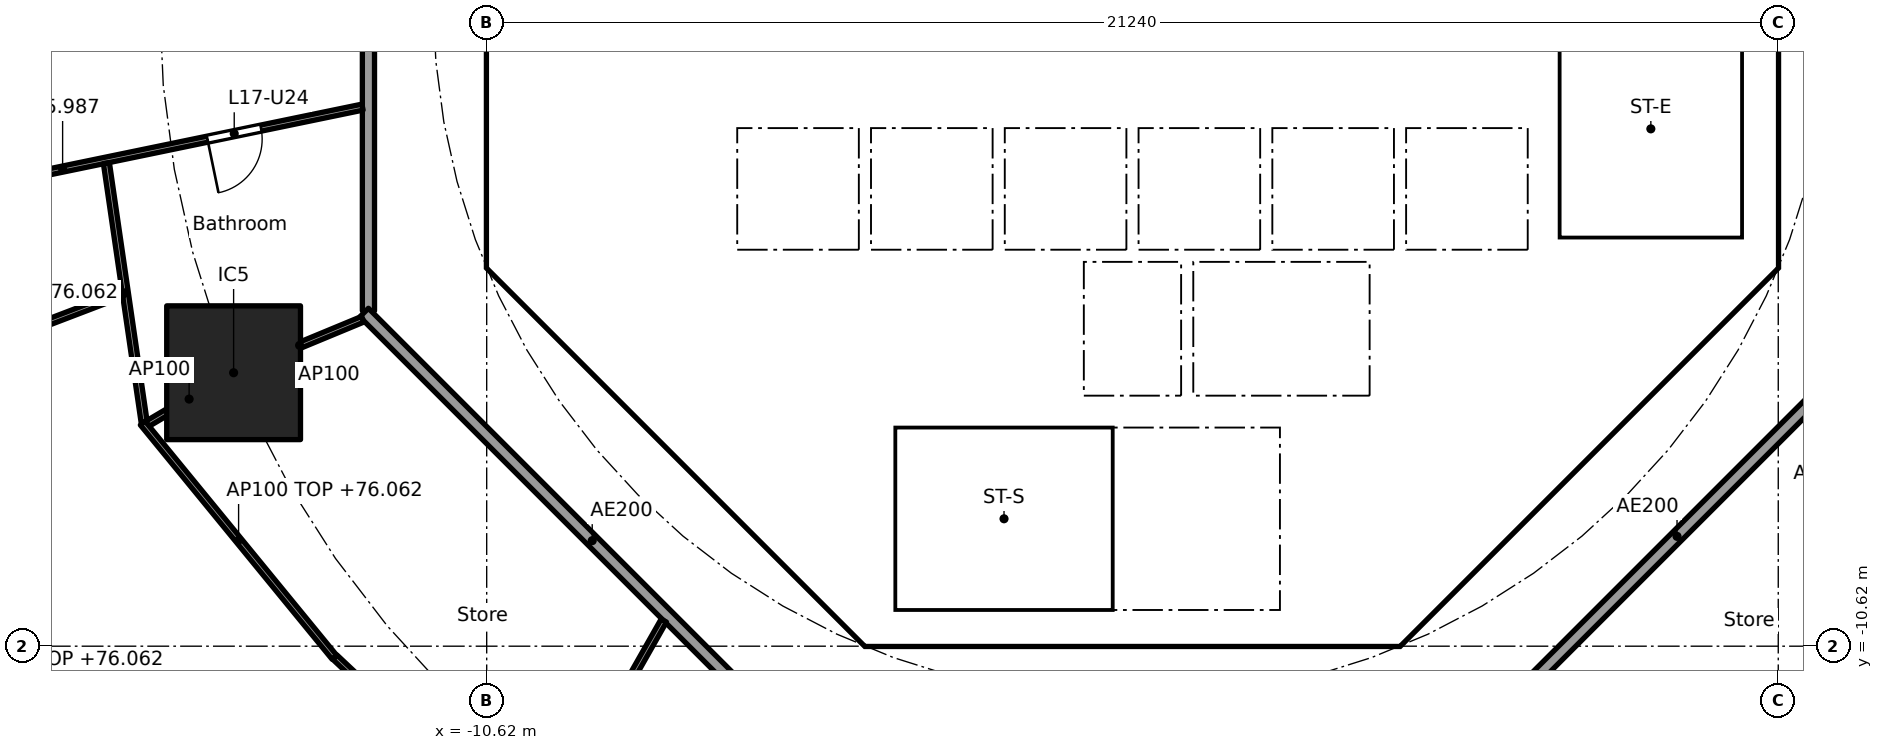
"""IFC4 building model, lengths in metres.
Left out: names, types, materials, properties, quantities, classifications, styles, units other than length and angle.
Written with IfcOpenShell. Run it as: python <this file> out.ifc"""

import sys

from ifc_helpers import new_model, si_unit, direction, frame, frame_2d, origin, origin_2d, place, context, subcontext, project, spatial, polyline, rectangle, outline, extrude, element, fill, save


model = new_model("IFC4")
c1 = context("Model", 3, precision=1e-05, world=origin(), true_north=direction((0.0, 1.0)))
c2 = subcontext(c1, "Body", "Model", "MODEL_VIEW")
j1 = project(units=[si_unit("LENGTHUNIT", "METRE"), si_unit("PLANEANGLEUNIT", "RADIAN")], contexts=[c1])
p1 = place(None, origin())
s1 = spatial("IfcSite", under=j1, at=p1, CompositionType="ELEMENT")
p2 = place(p1, origin())
s2 = spatial("IfcBuilding", under=s1, at=p2, CompositionType="ELEMENT")
p3 = place(p2, frame((0.0, 0.0, 73.3)))
s3 = spatial("IfcBuildingStorey", under=s2, at=p3, CompositionType="ELEMENT", Elevation=73.3)
p4 = place(p3, frame((-14.782, -6.123, 0.0), z_axis=(0.0, 0.0, 1.0), x_axis=(1.0, 0.0, 0.0)))
e1 = element("IfcColumn", 1, at=p4, inside=s3, PredefinedType="COLUMN", context=c2, shape_type="SweptSolid", body=[
    extrude(rectangle(XDim=2.2, YDim=2.2, at=origin_2d()), origin(), (0.0, 0.0, 1.0), 3.7),
])
p5 = place(p3, frame((-10.325, 3.801, 0.0), z_axis=(0.0, 0.0, 1.0), x_axis=(0.0, -1.0, 0.0)))
e2 = element("IfcWall", 2, at=p5, inside=s3, PredefinedType="SHEAR", context=c2, shape_type="SweptSolid", body=[
    extrude(rectangle(XDim=7.602, YDim=0.6, at=frame_2d((3.801, 0.0))), origin(), (0.0, 0.0, 1.0), 3.44),
])
p6 = place(p5, frame((0.651, 0.0, 0.0)))
e3 = element("IfcOpeningElement", 3, at=p6, cuts=e2, PredefinedType="OPENING", context=c2, shape_type="SweptSolid", body=[
    extrude(rectangle(XDim=1.5, YDim=2.1, at=frame_2d((0.75, 1.05))), frame((0.0, 0.31, 0.0), z_axis=(0.0, -1.0, 0.0), x_axis=(1.0, 0.0, 0.0)), (0.0, 0.0, 1.0), 0.62),
])
p7 = place(p5, frame((5.451, 0.0, 0.0)))
e4 = element("IfcOpeningElement", 4, at=p7, cuts=e2, PredefinedType="OPENING", context=c2, shape_type="SweptSolid", body=[
    extrude(rectangle(XDim=1.5, YDim=2.1, at=frame_2d((0.75, 1.05))), frame((0.0, 0.31, 0.0), z_axis=(0.0, -1.0, 0.0), x_axis=(1.0, 0.0, 0.0)), (0.0, 0.0, 1.0), 0.62),
])
p8 = place(p3, frame((-9.988, -4.613, 0.0), z_axis=(0.0, 0.0, 1.0), x_axis=(0.707106781187, -0.707106781187, 0.0)))
e5 = element("IfcWall", 5, at=p8, inside=s3, PredefinedType="SHEAR", context=c2, shape_type="SweptSolid", body=[
    extrude(rectangle(XDim=7.602, YDim=0.6, at=frame_2d((3.801, 0.0))), origin(), (0.0, 0.0, 1.0), 3.44),
])
p9 = place(p8, frame((6.151, 0.0, 0.0)))
e6 = element("IfcOpeningElement", 6, at=p9, cuts=e5, PredefinedType="OPENING", context=c2, shape_type="SweptSolid", body=[
    extrude(rectangle(XDim=1.1, YDim=2.1, at=frame_2d((0.55, 1.05))), frame((0.0, 0.31, 0.0), z_axis=(0.0, -1.0, 0.0), x_axis=(1.0, 0.0, 0.0)), (0.0, 0.0, 1.0), 0.62),
])
p10 = place(p3, frame((4.613, -9.988, 0.0), z_axis=(0.0, 0.0, 1.0), x_axis=(0.707106781187, 0.707106781187, 0.0)))
e7 = element("IfcWall", 7, at=p10, inside=s3, PredefinedType="SHEAR", context=c2, shape_type="SweptSolid", body=[
    extrude(rectangle(XDim=7.602, YDim=0.6, at=frame_2d((3.801, 0.0))), origin(), (0.0, 0.0, 1.0), 3.44),
])
p11 = place(p10, frame((3.201, 0.0, 0.0)))
e8 = element("IfcOpeningElement", 8, at=p11, cuts=e7, PredefinedType="OPENING", context=c2, shape_type="SweptSolid", body=[
    extrude(rectangle(XDim=1.2, YDim=2.1, at=frame_2d((0.6, 1.05))), frame((0.0, 0.31, 0.0), z_axis=(0.0, -1.0, 0.0), x_axis=(1.0, 0.0, 0.0)), (0.0, 0.0, 1.0), 0.62),
])
p12 = place(p3, frame((4.0, -10.025, 0.0), z_axis=(0.0, 0.0, 1.0), x_axis=(0.0, 1.0, 0.0)))
e9 = element("IfcWall", 9, at=p12, inside=s3, PredefinedType="SOLIDWALL", context=c2, shape_type="SweptSolid", body=[
    extrude(rectangle(XDim=3.0, YDim=0.2, at=frame_2d((1.5, 0.0))), origin(), (0.0, 0.0, 1.0), 3.44),
])
p13 = place(p12, frame((0.975, 0.0, 0.0)))
e10 = element("IfcOpeningElement", 10, at=p13, cuts=e9, PredefinedType="OPENING", context=c2, shape_type="SweptSolid", body=[
    extrude(rectangle(XDim=1.1, YDim=2.1, at=frame_2d((0.55, 1.05))), frame((0.0, 0.11, 0.0), z_axis=(0.0, -1.0, 0.0), x_axis=(1.0, 0.0, 0.0)), (0.0, 0.0, 1.0), 0.22),
])
p14 = place(p3, frame((-7.0, -7.027, 0.0), z_axis=(0.0, 0.0, 1.0), x_axis=(0.0, 1.0, 0.0)))
e11 = element("IfcWall", 11, at=p14, inside=s3, PredefinedType="PARTITIONING", context=c2, shape_type="SweptSolid", body=[
    extrude(rectangle(XDim=2.927, YDim=0.15, at=frame_2d((1.463, 0.0))), origin(), (0.0, 0.0, 1.0), 3.44),
])
p15 = place(p14, frame((0.976, 0.0, 0.0)))
e12 = element("IfcOpeningElement", 12, at=p15, cuts=e11, PredefinedType="OPENING", context=c2, shape_type="SweptSolid", body=[
    extrude(rectangle(XDim=0.9, YDim=2.1, at=frame_2d((0.45, 1.05))), frame((0.0, 0.085, 0.0), z_axis=(0.0, -1.0, 0.0), x_axis=(1.0, 0.0, 0.0)), (0.0, 0.0, 1.0), 0.17),
])
p16 = place(p3, frame((4.0, -6.5, 0.0), z_axis=(0.0, 0.0, 1.0), x_axis=(0.0, 1.0, 0.0)))
e13 = element("IfcWall", 13, at=p16, inside=s3, PredefinedType="SOLIDWALL", context=c2, shape_type="SweptSolid", body=[
    extrude(rectangle(XDim=2.2, YDim=0.2, at=frame_2d((1.1, 0.0))), origin(), (0.0, 0.0, 1.0), 3.44),
])
p17 = place(p16, frame((0.55, 0.0, 0.0)))
e14 = element("IfcOpeningElement", 14, at=p17, cuts=e13, PredefinedType="OPENING", context=c2, shape_type="SweptSolid", body=[
    extrude(rectangle(XDim=1.1, YDim=2.1, at=frame_2d((0.55, 1.05))), frame((0.0, 0.11, 0.0), z_axis=(0.0, -1.0, 0.0), x_axis=(1.0, 0.0, 0.0)), (0.0, 0.0, 1.0), 0.22),
])
p18 = place(p3, frame((-4.0, -6.5, 0.0), z_axis=(0.0, 0.0, 1.0), x_axis=(0.0, 1.0, 0.0)))
e15 = element("IfcWall", 15, at=p18, inside=s3, PredefinedType="SOLIDWALL", context=c2, shape_type="SweptSolid", body=[
    extrude(rectangle(XDim=2.2, YDim=0.2, at=frame_2d((1.1, 0.0))), origin(), (0.0, 0.0, 1.0), 3.44),
])
p19 = place(p18, frame((0.65, 0.0, 0.0)))
e16 = element("IfcOpeningElement", 16, at=p19, cuts=e15, PredefinedType="OPENING", context=c2, shape_type="SweptSolid", body=[
    extrude(rectangle(XDim=0.9, YDim=2.1, at=frame_2d((0.45, 1.05))), frame((0.0, 0.11, 0.0), z_axis=(0.0, -1.0, 0.0), x_axis=(1.0, 0.0, 0.0)), (0.0, 0.0, 1.0), 0.22),
])
p20 = place(p3, frame((-6.7, -2.0, 0.0), z_axis=(0.0, 0.0, 1.0), x_axis=(1.0, 0.0, 0.0)))
e17 = element("IfcWall", 17, at=p20, inside=s3, PredefinedType="SOLIDWALL", context=c2, shape_type="SweptSolid", body=[
    extrude(rectangle(XDim=13.4, YDim=0.2, at=frame_2d((6.7, 0.0))), origin(), (0.0, 0.0, 1.0), 3.44),
])
p21 = place(p20, frame((0.65, 0.0, 0.0)))
e18 = element("IfcOpeningElement", 18, at=p21, cuts=e17, PredefinedType="OPENING", context=c2, shape_type="SweptSolid", body=[
    extrude(rectangle(XDim=1.1, YDim=2.1, at=frame_2d((0.55, 1.05))), frame((0.0, 0.11, 0.0), z_axis=(0.0, -1.0, 0.0), x_axis=(1.0, 0.0, 0.0)), (0.0, 0.0, 1.0), 0.22),
])
p22 = place(p20, frame((2.85, 0.0, 0.0)))
e19 = element("IfcOpeningElement", 19, at=p22, cuts=e17, PredefinedType="OPENING", context=c2, shape_type="SweptSolid", body=[
    extrude(rectangle(XDim=1.1, YDim=2.1, at=frame_2d((0.55, 1.05))), frame((0.0, 0.11, 0.0), z_axis=(0.0, -1.0, 0.0), x_axis=(1.0, 0.0, 0.0)), (0.0, 0.0, 1.0), 0.22),
])
p23 = place(p3, origin())
e20 = element("IfcWall", 20, at=p23, inside=s3, PredefinedType="SHEAR", context=c2, shape_type="SweptSolid", body=[
    extrude(outline(polyline([(-10.625, -3.801), (-10.025, -3.801), (-10.025, -4.152), (-9.776, -4.401), (-10.2, -4.825), (-10.625, -4.401), (-10.625, -3.801)])), origin(), (0.0, 0.0, 1.0), 3.44),
])
p24 = place(p3, origin())
e21 = element("IfcWall", 21, at=p24, inside=s3, PredefinedType="SHEAR", context=c2, shape_type="SweptSolid", body=[
    extrude(outline(polyline([(-4.152, -10.025), (4.152, -10.025), (4.401, -9.776), (4.825, -10.2), (4.401, -10.625), (-4.401, -10.625), (-4.825, -10.2), (-4.401, -9.776), (-4.152, -10.025)])), origin(), (0.0, 0.0, 1.0), 3.44),
])
p25 = place(p3, origin())
e22 = element("IfcWall", 22, at=p25, inside=s3, PredefinedType="SHEAR", context=c2, shape_type="SweptSolid", body=[
    extrude(outline(polyline([(9.776, -4.401), (10.025, -4.152), (10.025, -3.801), (10.025, 4.152), (9.776, 4.401), (10.2, 4.825), (10.625, 4.401), (10.625, -4.401), (10.2, -4.825), (9.776, -4.401)])), origin(), (0.0, 0.0, 1.0), 3.44),
])
p26 = place(p3, frame((-10.025, -4.0, 0.0), z_axis=(0.0, 0.0, 1.0), x_axis=(1.0, 0.0, 0.0)))
e23 = element("IfcWall", 23, at=p26, inside=s3, PredefinedType="PARTITIONING", context=c2, shape_type="SweptSolid", body=[
    extrude(rectangle(XDim=3.325, YDim=0.2, at=frame_2d((1.662, 0.0))), origin(), (0.0, 0.0, 1.0), 3.44),
])
for number, where, z_axis, x_axis in (
    (24, (-0.9, -6.5, 0.0), (0.0, 0.0, 1.0), (0.0, 1.0, 0.0)),
    (25, (0.9, -6.5, 0.0), (0.0, 0.0, 1.0), (0.0, 1.0, 0.0)),
):
    element("IfcWall", number, at=place(p3, frame(where, z_axis=z_axis, x_axis=x_axis)), inside=s3, PredefinedType="SOLIDWALL", context=c2, shape_type="SweptSolid", body=[
        extrude(rectangle(XDim=2.2, YDim=0.2, at=frame_2d((1.1, 0.0))), origin(), (0.0, 0.0, 1.0), 3.44),
    ])
p27 = place(p3, origin())
e26 = element("IfcWall", 26, at=p27, inside=s3, PredefinedType="SOLIDWALL", context=c2, shape_type="SweptSolid", body=[
    extrude(outline(polyline([(-6.7, -2.1), (-6.5, -2.1), (-6.5, -4.1), (-4.5, -4.1), (-4.5, -2.1), (-4.3, -2.1), (-4.3, -4.1), (-2.3, -4.1), (-2.3, -2.1), (-2.1, -2.1), (-2.1, -4.1), (-0.1, -4.1), (-0.1, -2.1), (0.1, -2.1), (0.1, -4.1), (2.1, -4.1), (2.1, -2.1), (2.3, -2.1), (2.3, -4.1), (4.3, -4.1), (4.3, -2.1), (4.5, -2.1), (4.5, -4.1), (6.5, -4.1), (6.5, -2.1), (6.7, -2.1), (6.7, -4.3), (-6.7, -4.3), (-6.7, -2.1)])), origin(), (0.0, 0.0, 1.0), 3.44),
])
p28 = place(p3, origin())
e27 = element("IfcWall", 27, at=p28, inside=s3, PredefinedType="SOLIDWALL", context=c2, shape_type="SweptSolid", body=[
    extrude(outline(polyline([(-3.9, -10.025), (-4.1, -10.025), (-4.1, -7.025), (-3.9, -7.025), (-3.9, -10.025)])), origin(), (0.0, 0.0, 1.0), 3.44),
])
p29 = place(p3, origin())
e28 = element("IfcWall", 28, at=p29, inside=s3, PredefinedType="SOLIDWALL", context=c2, shape_type="SweptSolid", body=[
    extrude(outline(polyline([(4.1, -7.025), (-4.1, -7.025), (-4.1, -6.5), (4.1, -6.5), (4.1, -7.025)])), origin(), (0.0, 0.0, 1.0), 3.44),
])
p30 = place(p3, origin())
e29 = element("IfcWall", 29, at=p30, inside=s3, PredefinedType="SOLIDWALL", context=c2, shape_type="SweptSolid", body=[
    extrude(outline(polyline([(7.025, -3.9), (6.7, -3.9), (6.7, 3.9), (7.025, 3.9), (7.025, -3.9)])), origin(), (0.0, 0.0, 1.0), 3.44),
])
p31 = place(p3, origin())
e30 = element("IfcWall", 30, at=p31, inside=s3, PredefinedType="SOLIDWALL", context=c2, shape_type="SweptSolid", body=[
    extrude(outline(polyline([(10.025, -4.1), (6.7, -4.1), (6.7, -3.9), (10.025, -3.9), (10.025, -4.1)])), origin(), (0.0, 0.0, 1.0), 3.44),
])
p32 = place(p3, frame((-12.565, 5.304, 0.0), z_axis=(0.0, 0.0, 1.0), x_axis=(0.0, -1.0, 0.0)))
e31 = element("IfcWall", 31, at=p32, inside=s3, PredefinedType="PARTITIONING", context=c2, shape_type="SweptSolid", body=[
    extrude(rectangle(XDim=10.409, YDim=0.2, at=frame_2d((5.205, 0.0))), origin(), (0.0, 0.0, 1.0), 3.44),
])
p33 = place(p32, frame((4.804, 0.0, 0.0)))
e32 = element("IfcOpeningElement", 32, at=p33, cuts=e31, PredefinedType="OPENING", context=c2, shape_type="SweptSolid", body=[
    extrude(rectangle(XDim=1.0, YDim=2.1, at=frame_2d((0.5, 1.05))), frame((0.0, 0.11, 0.0), z_axis=(0.0, -1.0, 0.0), x_axis=(1.0, 0.0, 0.0)), (0.0, 0.0, 1.0), 0.22),
])
p34 = place(p3, frame((-12.635, -5.134, 0.0), z_axis=(0.0, 0.0, 1.0), x_axis=(0.707106781187, -0.707106781187, 0.0)))
e33 = element("IfcWall", 33, at=p34, inside=s3, PredefinedType="PARTITIONING", context=c2, shape_type="SweptSolid", body=[
    extrude(rectangle(XDim=10.609, YDim=0.2, at=frame_2d((5.305, 0.0))), origin(), (0.0, 0.0, 1.0), 3.44),
])
p35 = place(p3, frame((5.275, -12.494, 0.0), z_axis=(0.0, 0.0, 1.0), x_axis=(0.707106781187, 0.707106781187, 0.0)))
e34 = element("IfcWall", 34, at=p35, inside=s3, PredefinedType="PARTITIONING", context=c2, shape_type="SweptSolid", body=[
    extrude(rectangle(XDim=10.409, YDim=0.2, at=frame_2d((5.205, 0.0))), origin(), (0.0, 0.0, 1.0), 3.44),
])
p36 = place(p3, frame((-12.663, -1.755, 0.0), z_axis=(0.0, 0.0, 1.0), x_axis=(-0.979304677471, -0.202391572657, 0.0)))
e35 = element("IfcWall", 35, at=p36, inside=s3, PredefinedType="PARTITIONING", context=c2, shape_type="SweptSolid", body=[
    extrude(rectangle(XDim=10.071, YDim=0.1, at=frame_2d((5.036, 0.0))), origin(), (0.0, 0.0, 1.0), 2.687),
])
p37 = place(p36, frame((1.704, 0.0, 0.0)))
e36 = element("IfcOpeningElement", 36, at=p37, cuts=e35, PredefinedType="OPENING", context=c2, shape_type="SweptSolid", body=[
    extrude(rectangle(XDim=0.9, YDim=2.1, at=frame_2d((0.45, 1.05))), frame((0.0, 0.06, 0.0), z_axis=(0.0, -1.0, 0.0), x_axis=(1.0, 0.0, 0.0)), (0.0, 0.0, 1.0), 0.12),
])
p38 = place(p36, frame((6.714, 0.0, 0.0)))
e37 = element("IfcOpeningElement", 37, at=p38, cuts=e35, PredefinedType="OPENING", context=c2, shape_type="SweptSolid", body=[
    extrude(rectangle(XDim=0.9, YDim=2.1, at=frame_2d((0.45, 1.05))), frame((0.0, 0.06, 0.0), z_axis=(0.0, -1.0, 0.0), x_axis=(1.0, 0.0, 0.0)), (0.0, 0.0, 1.0), 0.12),
])
p39 = place(p3, frame((-16.874, -2.677, 0.0), z_axis=(0.0, 0.0, 1.0), x_axis=(0.144260658133, -0.989539722555, 0.0)))
e38 = element("IfcWall", 38, at=p39, inside=s3, PredefinedType="PARTITIONING", context=c2, shape_type="SweptSolid", body=[
    extrude(rectangle(XDim=4.309, YDim=0.1, at=frame_2d((2.154, 0.0))), origin(), (0.0, 0.0, 1.0), 2.762),
])
p40 = place(p3, frame((-16.61, -4.826, 0.0), z_axis=(0.0, 0.0, 1.0), x_axis=(-0.934174502909, -0.356816476798, 0.0)))
e39 = element("IfcWall", 39, at=p40, inside=s3, PredefinedType="PARTITIONING", context=c2, shape_type="SweptSolid", body=[
    extrude(rectangle(XDim=11.496, YDim=0.1, at=frame_2d((5.748, 0.0))), origin(), (0.0, 0.0, 1.0), 2.837),
])
p41 = place(p40, frame((7.993, 0.0, 0.0)))
e40 = element("IfcOpeningElement", 40, at=p41, cuts=e39, PredefinedType="OPENING", context=c2, shape_type="SweptSolid", body=[
    extrude(rectangle(XDim=0.9, YDim=2.1, at=frame_2d((0.45, 1.05))), frame((0.0, 0.06, 0.0), z_axis=(0.0, -1.0, 0.0), x_axis=(1.0, 0.0, 0.0)), (0.0, 0.0, 1.0), 0.12),
])
p42 = place(p3, frame((-12.657, -5.243, 0.0), z_axis=(0.0, 0.0, 1.0), x_axis=(-0.923864733477, -0.382719158442, 0.0)))
e41 = element("IfcWall", 41, at=p42, inside=s3, PredefinedType="PARTITIONING", context=c2, shape_type="SweptSolid", body=[
    extrude(rectangle(XDim=2.25, YDim=0.1, at=frame_2d((1.125, 0.0))), origin(), (0.0, 0.0, 1.0), 3.44),
])
p43 = place(p3, frame((-14.825, -6.148, 0.0), z_axis=(0.0, 0.0, 1.0), x_axis=(-0.860452514841, -0.509530636669, 0.0)))
e42 = element("IfcWall", 42, at=p43, inside=s3, PredefinedType="PARTITIONING", context=c2, shape_type="SweptSolid", body=[
    extrude(rectangle(XDim=1.601, YDim=0.1, at=frame_2d((0.8, 0.0))), origin(), (0.0, 0.0, 1.0), 3.44),
])
p44 = place(p3, frame((-16.277, -6.951, 0.0), z_axis=(0.0, 0.0, 1.0), x_axis=(0.633427340372, -0.773802173988, 0.0)))
e43 = element("IfcWall", 43, at=p44, inside=s3, PredefinedType="PARTITIONING", context=c2, shape_type="SweptSolid", body=[
    extrude(rectangle(XDim=4.979, YDim=0.1, at=frame_2d((2.49, 0.0))), origin(), (0.0, 0.0, 1.0), 2.762),
])
p45 = place(p3, frame((-20.848, -9.658, 0.0), z_axis=(0.0, 0.0, 1.0), x_axis=(0.5895799361, -0.807710033953, 0.0)))
e44 = element("IfcWall", 44, at=p45, inside=s3, PredefinedType="PARTITIONING", context=c2, shape_type="SweptSolid", body=[
    extrude(rectangle(XDim=6.408, YDim=0.1, at=frame_2d((3.204, 0.0))), origin(), (0.0, 0.0, 1.0), 2.762),
])
p46 = place(p45, frame((2.754, 0.0, 0.0)))
e45 = element("IfcOpeningElement", 45, at=p46, cuts=e44, PredefinedType="OPENING", context=c2, shape_type="SweptSolid", body=[
    extrude(rectangle(XDim=0.9, YDim=2.1, at=frame_2d((0.45, 1.05))), frame((0.0, 0.06, 0.0), z_axis=(0.0, -1.0, 0.0), x_axis=(1.0, 0.0, 0.0)), (0.0, 0.0, 1.0), 0.12),
])
p47 = place(p3, frame((-13.118, -10.8, 0.0), z_axis=(0.0, 0.0, 1.0), x_axis=(0.72818280142, -0.685382964273, 0.0)))
e46 = element("IfcWall", 46, at=p47, inside=s3, PredefinedType="PARTITIONING", context=c2, shape_type="SweptSolid", body=[
    extrude(rectangle(XDim=4.586, YDim=0.1, at=frame_2d((2.293, 0.0))), origin(), (0.0, 0.0, 1.0), 2.762),
])
p48 = place(p47, frame((2.94, 0.0, 0.0)))
e47 = element("IfcOpeningElement", 47, at=p48, cuts=e46, PredefinedType="OPENING", context=c2, shape_type="SweptSolid", body=[
    extrude(rectangle(XDim=0.9, YDim=2.1, at=frame_2d((0.45, 1.05))), frame((0.0, 0.06, 0.0), z_axis=(0.0, -1.0, 0.0), x_axis=(1.0, 0.0, 0.0)), (0.0, 0.0, 1.0), 0.12),
])
p49 = place(p3, frame((-7.707, -10.198, 0.0), z_axis=(0.0, 0.0, 1.0), x_axis=(-0.493986531217, -0.869469554945, 0.0)))
e48 = element("IfcWall", 48, at=p49, inside=s3, PredefinedType="PARTITIONING", context=c2, shape_type="SweptSolid", body=[
    extrude(rectangle(XDim=4.217, YDim=0.1, at=frame_2d((2.109, 0.0))), origin(), (0.0, 0.0, 1.0), 2.687),
])
p50 = place(p21, origin())
e49 = element("IfcDoor", 49, at=p50, inside=s3, OperationType="DOUBLE_DOOR_SLIDING", PredefinedType="DOOR", context=c2, shape_type="SweptSolid", body=[
    extrude(rectangle(XDim=1.1, YDim=2.1, at=frame_2d((0.55, 1.05))), frame((0.0, 0.025, 0.0), z_axis=(0.0, -1.0, 0.0), x_axis=(1.0, 0.0, 0.0)), (0.0, 0.0, 1.0), 0.05),
])
fill(e18, e49)
p51 = place(p22, origin())
e50 = element("IfcDoor", 50, at=p51, inside=s3, OperationType="DOUBLE_DOOR_SLIDING", PredefinedType="DOOR", context=c2, shape_type="SweptSolid", body=[
    extrude(rectangle(XDim=1.1, YDim=2.1, at=frame_2d((0.55, 1.05))), frame((0.0, 0.025, 0.0), z_axis=(0.0, -1.0, 0.0), x_axis=(1.0, 0.0, 0.0)), (0.0, 0.0, 1.0), 0.05),
])
fill(e19, e50)
p52 = place(p17, origin())
e51 = element("IfcDoor", 51, at=p52, inside=s3, OperationType="DOUBLE_DOOR_SLIDING", PredefinedType="DOOR", context=c2, shape_type="SweptSolid", body=[
    extrude(rectangle(XDim=1.1, YDim=2.1, at=frame_2d((0.55, 1.05))), frame((0.0, 0.025, 0.0), z_axis=(0.0, -1.0, 0.0), x_axis=(1.0, 0.0, 0.0)), (0.0, 0.0, 1.0), 0.05),
])
fill(e14, e51)
p53 = place(p13, origin())
e52 = element("IfcDoor", 52, at=p53, inside=s3, OperationType="SINGLE_SWING_RIGHT", PredefinedType="DOOR", context=c2, shape_type="SweptSolid", body=[
    extrude(rectangle(XDim=1.1, YDim=2.1, at=frame_2d((0.55, 1.05))), frame((0.0, 0.025, 0.0), z_axis=(0.0, -1.0, 0.0), x_axis=(1.0, 0.0, 0.0)), (0.0, 0.0, 1.0), 0.05),
])
fill(e10, e52)
p54 = place(p15, origin())
e53 = element("IfcDoor", 53, at=p54, inside=s3, OperationType="SINGLE_SWING_RIGHT", PredefinedType="DOOR", context=c2, shape_type="SweptSolid", body=[
    extrude(rectangle(XDim=0.9, YDim=2.1, at=frame_2d((0.45, 1.05))), frame((0.0, 0.025, 0.0), z_axis=(0.0, -1.0, 0.0), x_axis=(1.0, 0.0, 0.0)), (0.0, 0.0, 1.0), 0.05),
])
fill(e12, e53)
p55 = place(p19, frame((0.9, 0.0, 0.0), x_axis=(-1.0, 0.0, 0.0)))
e54 = element("IfcDoor", 54, at=p55, inside=s3, OperationType="SINGLE_SWING_LEFT", PredefinedType="DOOR", context=c2, shape_type="SweptSolid", body=[
    extrude(rectangle(XDim=0.9, YDim=2.1, at=frame_2d((0.45, 1.05))), frame((0.0, 0.025, 0.0), z_axis=(0.0, -1.0, 0.0), x_axis=(1.0, 0.0, 0.0)), (0.0, 0.0, 1.0), 0.05),
])
fill(e16, e54)
p56 = place(p11, origin())
e55 = element("IfcDoor", 55, at=p56, inside=s3, OperationType="SINGLE_SWING_LEFT", PredefinedType="DOOR", context=c2, shape_type="SweptSolid", body=[
    extrude(rectangle(XDim=1.2, YDim=2.1, at=frame_2d((0.6, 1.05))), frame((0.0, 0.025, 0.0), z_axis=(0.0, -1.0, 0.0), x_axis=(1.0, 0.0, 0.0)), (0.0, 0.0, 1.0), 0.05),
])
fill(e8, e55)
p57 = place(p7, origin())
e56 = element("IfcDoor", 56, at=p57, inside=s3, OperationType="DOUBLE_DOOR_SINGLE_SWING", PredefinedType="DOOR", context=c2, shape_type="SweptSolid", body=[
    extrude(rectangle(XDim=1.5, YDim=2.1, at=frame_2d((0.75, 1.05))), frame((0.0, 0.025, 0.0), z_axis=(0.0, -1.0, 0.0), x_axis=(1.0, 0.0, 0.0)), (0.0, 0.0, 1.0), 0.05),
])
fill(e4, e56)
p58 = place(p9, origin())
e57 = element("IfcDoor", 57, at=p58, inside=s3, OperationType="SINGLE_SWING_LEFT", PredefinedType="DOOR", context=c2, shape_type="SweptSolid", body=[
    extrude(rectangle(XDim=1.1, YDim=2.1, at=frame_2d((0.55, 1.05))), frame((0.0, 0.025, 0.0), z_axis=(0.0, -1.0, 0.0), x_axis=(1.0, 0.0, 0.0)), (0.0, 0.0, 1.0), 0.05),
])
fill(e6, e57)
p59 = place(p37, origin())
e58 = element("IfcDoor", 58, at=p59, inside=s3, OperationType="SINGLE_SWING_RIGHT", PredefinedType="DOOR", context=c2, shape_type="SweptSolid", body=[
    extrude(rectangle(XDim=0.9, YDim=2.1, at=frame_2d((0.45, 1.05))), frame((0.0, 0.025, 0.0), z_axis=(0.0, -1.0, 0.0), x_axis=(1.0, 0.0, 0.0)), (0.0, 0.0, 1.0), 0.05),
])
fill(e36, e58)
save(model, sys.argv[1])
